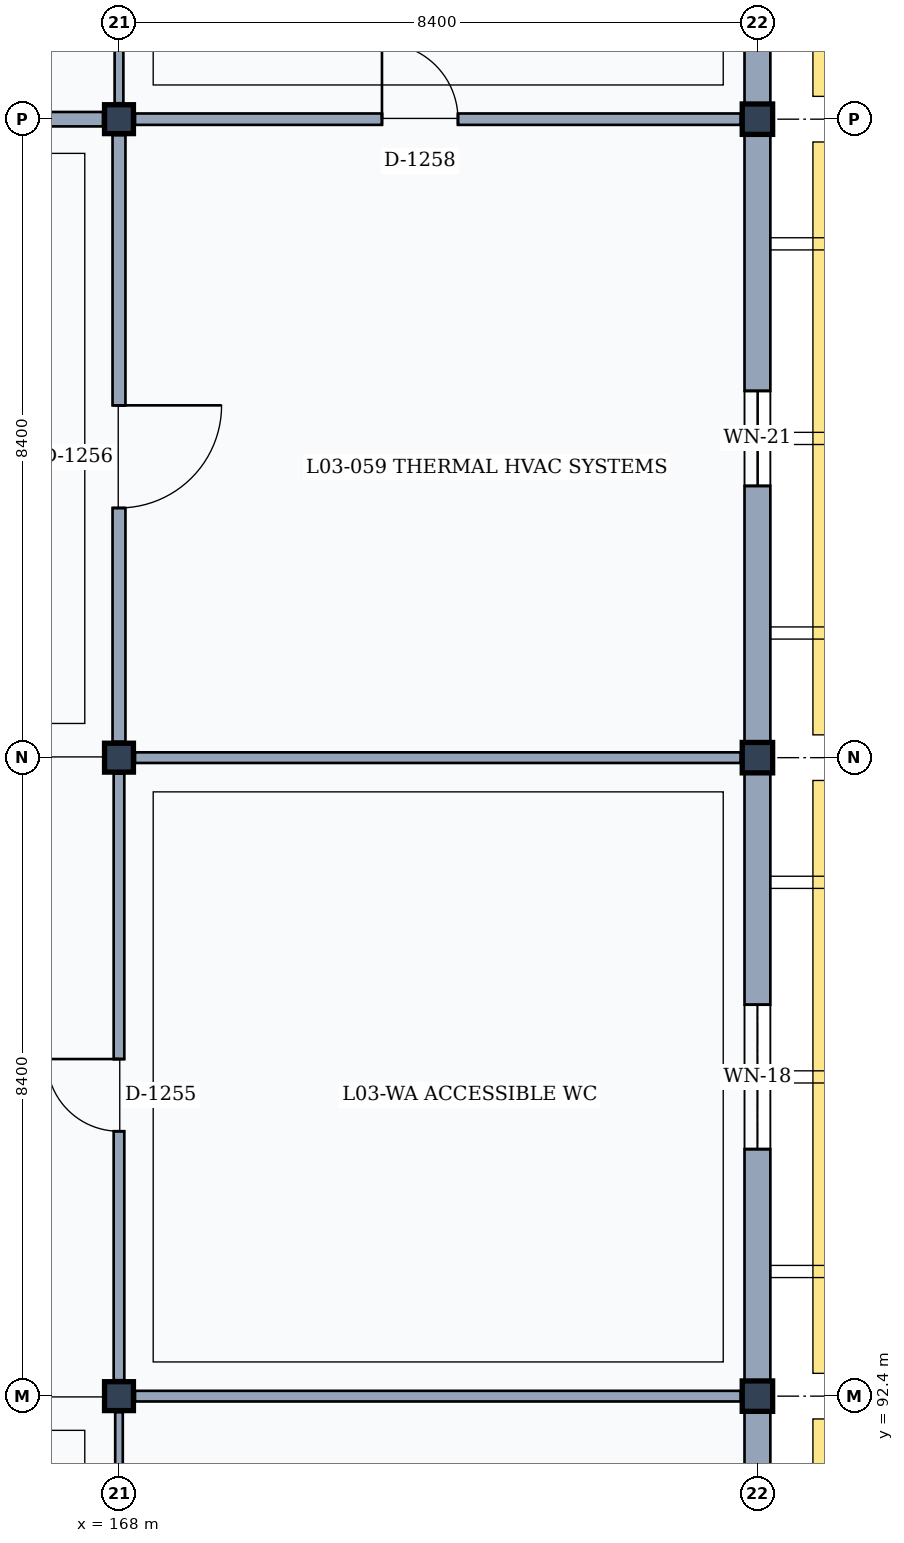
"""IFC4 building model, lengths in metres.
Left out: names, types, materials, properties, quantities, classifications, styles, units other than length and angle.
Written with IfcOpenShell. Run it as: python <this file> out.ifc"""

import sys

from ifc_helpers import new_model, si_unit, direction, frame, frame_2d, origin, origin_2d, place, context, subcontext, project, spatial, rectangle, extrude, element, fill, save


model = new_model("IFC4")
c1 = context("Model", 3, precision=1e-05, world=origin(), true_north=direction((0.0, 1.0)))
c2 = subcontext(c1, "Body", "Model", "MODEL_VIEW")
j1 = project(units=[si_unit("LENGTHUNIT", "METRE"), si_unit("PLANEANGLEUNIT", "RADIAN")], contexts=[c1])
p1 = place(None, origin())
s1 = spatial("IfcSite", under=j1, at=p1, CompositionType="ELEMENT")
p2 = place(p1, origin())
s2 = spatial("IfcBuilding", under=s1, at=p2, CompositionType="ELEMENT")
p3 = place(p2, frame((0.0, 0.0, 13.8)))
s3 = spatial("IfcBuildingStorey", under=s2, at=p3, CompositionType="ELEMENT", Elevation=13.8)
for number, where, z_axis, x_axis in (
    (1, (168.0, 92.4, 0.0), (0.0, 0.0, 1.0), (1.0, 0.0, 0.0)),
    (2, (168.0, 100.8, 0.0), (0.0, 0.0, 1.0), (1.0, 0.0, 0.0)),
    (3, (168.0, 109.2, 0.0), (0.0, 0.0, 1.0), (1.0, 0.0, 0.0)),
):
    element("IfcColumn", number, at=place(p3, frame(where, z_axis=z_axis, x_axis=x_axis)), inside=s3, PredefinedType="COLUMN", context=c2, shape_type="SweptSolid", body=[
        extrude(rectangle(XDim=0.38, YDim=0.38, at=origin_2d()), origin(), (0.0, 0.0, 1.0), 4.2),
    ])
for number, where, z_axis, x_axis in (
    (4, (176.4, 92.4, 0.0), (0.0, 0.0, 1.0), (1.0, 0.0, 0.0)),
    (5, (176.4, 100.8, 0.0), (0.0, 0.0, 1.0), (1.0, 0.0, 0.0)),
    (6, (176.4, 109.2, 0.0), (0.0, 0.0, 1.0), (1.0, 0.0, 0.0)),
):
    element("IfcColumn", number, at=place(p3, frame(where, z_axis=z_axis, x_axis=x_axis)), inside=s3, PredefinedType="COLUMN", context=c2, shape_type="SweptSolid", body=[
        extrude(rectangle(XDim=0.4, YDim=0.4, at=origin_2d()), origin(), (0.0, 0.0, 1.0), 4.2),
    ])
p4 = place(p3, frame((176.4, 92.2, 0.0), z_axis=(0.0, 0.0, 1.0), x_axis=(0.0, -1.0, 0.0)))
e7 = element("IfcWall", 7, at=p4, inside=s3, PredefinedType="SOLIDWALL", context=c2, shape_type="SweptSolid", body=[
    extrude(rectangle(XDim=8.0, YDim=0.34, at=frame_2d((4.0, 0.0))), origin(), (0.0, 0.0, 1.0), 3.36),
])
p5 = place(p4, frame((3.45, 0.0, 0.9)))
e8 = element("IfcOpeningElement", 8, at=p5, cuts=e7, PredefinedType="OPENING", context=c2, shape_type="SweptSolid", body=[
    extrude(rectangle(XDim=1.1, YDim=1.95, at=frame_2d((0.55, 0.975))), frame((0.0, 0.18, 0.0), z_axis=(0.0, -1.0, 0.0), x_axis=(1.0, 0.0, 0.0)), (0.0, 0.0, 1.0), 0.36),
])
p6 = place(p3, frame((176.4, 100.6, 0.0), z_axis=(0.0, 0.0, 1.0), x_axis=(0.0, -1.0, 0.0)))
e9 = element("IfcWall", 9, at=p6, inside=s3, PredefinedType="SOLIDWALL", context=c2, shape_type="SweptSolid", body=[
    extrude(rectangle(XDim=8.0, YDim=0.34, at=frame_2d((4.0, 0.0))), origin(), (0.0, 0.0, 1.0), 3.36),
])
p7 = place(p6, frame((3.05, 0.0, 0.9)))
e10 = element("IfcOpeningElement", 10, at=p7, cuts=e9, PredefinedType="OPENING", context=c2, shape_type="SweptSolid", body=[
    extrude(rectangle(XDim=1.9, YDim=2.05, at=frame_2d((0.95, 1.025))), frame((0.0, 0.18, 0.0), z_axis=(0.0, -1.0, 0.0), x_axis=(1.0, 0.0, 0.0)), (0.0, 0.0, 1.0), 0.36),
])
p8 = place(p3, frame((176.4, 109.0, 0.0), z_axis=(0.0, 0.0, 1.0), x_axis=(0.0, -1.0, 0.0)))
e11 = element("IfcWall", 11, at=p8, inside=s3, PredefinedType="SOLIDWALL", context=c2, shape_type="SweptSolid", body=[
    extrude(rectangle(XDim=8.0, YDim=0.34, at=frame_2d((4.0, 0.0))), origin(), (0.0, 0.0, 1.0), 3.36),
])
p9 = place(p8, frame((3.375, 0.0, 0.9)))
e12 = element("IfcOpeningElement", 12, at=p9, cuts=e11, PredefinedType="OPENING", context=c2, shape_type="SweptSolid", body=[
    extrude(rectangle(XDim=1.25, YDim=1.7, at=frame_2d((0.625, 0.85))), frame((0.0, 0.18, 0.0), z_axis=(0.0, -1.0, 0.0), x_axis=(1.0, 0.0, 0.0)), (0.0, 0.0, 1.0), 0.36),
])
p10 = place(p3, frame((176.4, 117.4, 0.0), z_axis=(0.0, 0.0, 1.0), x_axis=(0.0, -1.0, 0.0)))
e13 = element("IfcWall", 13, at=p10, inside=s3, PredefinedType="SOLIDWALL", context=c2, shape_type="SweptSolid", body=[
    extrude(rectangle(XDim=8.0, YDim=0.34, at=frame_2d((4.0, 0.0))), origin(), (0.0, 0.0, 1.0), 3.36),
])
p11 = place(p10, frame((3.075, 0.0, 0.9)))
e14 = element("IfcOpeningElement", 14, at=p11, cuts=e13, PredefinedType="OPENING", context=c2, shape_type="SweptSolid", body=[
    extrude(rectangle(XDim=1.85, YDim=1.65, at=frame_2d((0.925, 0.825))), frame((0.0, 0.18, 0.0), z_axis=(0.0, -1.0, 0.0), x_axis=(1.0, 0.0, 0.0)), (0.0, 0.0, 1.0), 0.36),
])
p12 = place(p3, frame((168.0, 84.21, 0.0), z_axis=(0.0, 0.0, 1.0), x_axis=(0.0, 1.0, 0.0)))
e15 = element("IfcWall", 15, at=p12, inside=s3, PredefinedType="MOVABLE", context=c2, shape_type="SweptSolid", body=[
    extrude(rectangle(XDim=7.98, YDim=0.1, at=frame_2d((3.99, 0.0))), origin(), (0.0, 0.0, 1.0), 3.32),
])
p13 = place(p12, frame((3.3, 0.0, 0.0)))
e16 = element("IfcOpeningElement", 16, at=p13, cuts=e15, PredefinedType="OPENING", context=c2, shape_type="SweptSolid", body=[
    extrude(rectangle(XDim=0.9, YDim=2.1, at=frame_2d((0.45, 1.05))), frame((0.0, 0.06, 0.0), z_axis=(0.0, -1.0, 0.0), x_axis=(1.0, 0.0, 0.0)), (0.0, 0.0, 1.0), 0.12),
])
p14 = place(p3, frame((168.0, 92.61, 0.0), z_axis=(0.0, 0.0, 1.0), x_axis=(0.0, 1.0, 0.0)))
e17 = element("IfcWall", 17, at=p14, inside=s3, PredefinedType="PARTITIONING", context=c2, shape_type="SweptSolid", body=[
    extrude(rectangle(XDim=7.98, YDim=0.14, at=frame_2d((3.99, 0.0))), origin(), (0.0, 0.0, 1.0), 3.32),
])
p15 = place(p14, frame((3.275, 0.0, 0.0)))
e18 = element("IfcOpeningElement", 18, at=p15, cuts=e17, PredefinedType="OPENING", context=c2, shape_type="SweptSolid", body=[
    extrude(rectangle(XDim=0.95, YDim=2.15, at=frame_2d((0.475, 1.075))), frame((0.0, 0.08, 0.0), z_axis=(0.0, -1.0, 0.0), x_axis=(1.0, 0.0, 0.0)), (0.0, 0.0, 1.0), 0.16),
])
p16 = place(p3, frame((168.0, 101.01, 0.0), z_axis=(0.0, 0.0, 1.0), x_axis=(0.0, 1.0, 0.0)))
e19 = element("IfcWall", 19, at=p16, inside=s3, PredefinedType="PARTITIONING", context=c2, shape_type="SweptSolid", body=[
    extrude(rectangle(XDim=7.98, YDim=0.17, at=frame_2d((3.99, 0.0))), origin(), (0.0, 0.0, 1.0), 3.32),
])
p17 = place(p16, frame((3.075, 0.0, 0.0)))
e20 = element("IfcOpeningElement", 20, at=p17, cuts=e19, PredefinedType="OPENING", context=c2, shape_type="SweptSolid", body=[
    extrude(rectangle(XDim=1.35, YDim=2.25, at=frame_2d((0.675, 1.125))), frame((0.0, 0.095, 0.0), z_axis=(0.0, -1.0, 0.0), x_axis=(1.0, 0.0, 0.0)), (0.0, 0.0, 1.0), 0.19),
])
p18 = place(p3, frame((159.82, 109.2, 0.0), z_axis=(0.0, 0.0, 1.0), x_axis=(1.0, 0.0, 0.0)))
e21 = element("IfcWall", 21, at=p18, inside=s3, PredefinedType="PARTITIONING", context=c2, shape_type="SweptSolid", body=[
    extrude(rectangle(XDim=7.97, YDim=0.19, at=frame_2d((3.985, 0.0))), origin(), (0.0, 0.0, 1.0), 3.22),
])
p19 = place(p18, frame((3.025, 0.0, 0.0)))
e22 = element("IfcOpeningElement", 22, at=p19, cuts=e21, PredefinedType="OPENING", context=c2, shape_type="SweptSolid", body=[
    extrude(rectangle(XDim=1.45, YDim=2.35, at=frame_2d((0.725, 1.175))), frame((0.0, 0.105, 0.0), z_axis=(0.0, -1.0, 0.0), x_axis=(1.0, 0.0, 0.0)), (0.0, 0.0, 1.0), 0.21),
])
p20 = place(p3, frame((168.0, 109.41, 0.0), z_axis=(0.0, 0.0, 1.0), x_axis=(0.0, 1.0, 0.0)))
e23 = element("IfcWall", 23, at=p20, inside=s3, PredefinedType="PARTITIONING", context=c2, shape_type="SweptSolid", body=[
    extrude(rectangle(XDim=7.98, YDim=0.115, at=frame_2d((3.99, 0.0))), origin(), (0.0, 0.0, 1.0), 3.32),
])
for number, where, z_axis, x_axis in (
    (24, (168.21, 92.4, 0.0), (0.0, 0.0, 1.0), (1.0, 0.0, 0.0)),
    (25, (168.21, 100.8, 0.0), (0.0, 0.0, 1.0), (1.0, 0.0, 0.0)),
):
    element("IfcWall", number, at=place(p3, frame(where, z_axis=z_axis, x_axis=x_axis)), inside=s3, PredefinedType="PARTITIONING", context=c2, shape_type="SweptSolid", body=[
        extrude(rectangle(XDim=7.97, YDim=0.14, at=frame_2d((3.985, 0.0))), origin(), (0.0, 0.0, 1.0), 3.22),
    ])
p21 = place(p3, frame((168.21, 109.2, 0.0), z_axis=(0.0, 0.0, 1.0), x_axis=(1.0, 0.0, 0.0)))
e26 = element("IfcWall", 26, at=p21, inside=s3, PredefinedType="PARTITIONING", context=c2, shape_type="SweptSolid", body=[
    extrude(rectangle(XDim=7.97, YDim=0.15, at=frame_2d((3.985, 0.0))), origin(), (0.0, 0.0, 1.0), 3.22),
])
p22 = place(p21, frame((3.25, 0.0, 0.0)))
e27 = element("IfcOpeningElement", 27, at=p22, cuts=e26, PredefinedType="OPENING", context=c2, shape_type="SweptSolid", body=[
    extrude(rectangle(XDim=1.0, YDim=2.15, at=frame_2d((0.5, 1.075))), frame((0.0, 0.085, 0.0), z_axis=(0.0, -1.0, 0.0), x_axis=(1.0, 0.0, 0.0)), (0.0, 0.0, 1.0), 0.17),
])
p23 = place(p7, origin())
e28 = element("IfcWindow", 28, at=p23, inside=s3, PartitioningType="SINGLE_PANEL", PredefinedType="WINDOW", context=c2, shape_type="SweptSolid", body=[
    extrude(rectangle(XDim=1.9, YDim=2.05, at=frame_2d((0.95, 1.025))), frame((0.0, 0.03, 0.0), z_axis=(0.0, -1.0, 0.0), x_axis=(1.0, 0.0, 0.0)), (0.0, 0.0, 1.0), 0.06),
])
fill(e10, e28)
p24 = place(p9, origin())
e29 = element("IfcWindow", 29, at=p24, inside=s3, PartitioningType="SINGLE_PANEL", PredefinedType="WINDOW", context=c2, shape_type="SweptSolid", body=[
    extrude(rectangle(XDim=1.25, YDim=1.7, at=frame_2d((0.625, 0.85))), frame((0.0, 0.03, 0.0), z_axis=(0.0, -1.0, 0.0), x_axis=(1.0, 0.0, 0.0)), (0.0, 0.0, 1.0), 0.06),
])
fill(e12, e29)
p25 = place(p15, origin())
e30 = element("IfcDoor", 30, at=p25, inside=s3, OperationType="SINGLE_SWING_RIGHT", PredefinedType="DOOR", context=c2, shape_type="SweptSolid", body=[
    extrude(rectangle(XDim=0.95, YDim=2.15, at=frame_2d((0.475, 1.075))), frame((0.0, 0.025, 0.0), z_axis=(0.0, -1.0, 0.0), x_axis=(1.0, 0.0, 0.0)), (0.0, 0.0, 1.0), 0.05),
])
fill(e18, e30)
p26 = place(p17, frame((1.35, 0.0, 0.0), z_axis=(0.0, 0.0, 1.0), x_axis=(-1.0, 0.0, 0.0)))
e31 = element("IfcDoor", 31, at=p26, inside=s3, OperationType="SINGLE_SWING_LEFT", PredefinedType="DOOR", context=c2, shape_type="SweptSolid", body=[
    extrude(rectangle(XDim=1.35, YDim=2.25, at=frame_2d((0.675, 1.125))), frame((0.0, 0.025, 0.0), z_axis=(0.0, -1.0, 0.0), x_axis=(1.0, 0.0, 0.0)), (0.0, 0.0, 1.0), 0.05),
])
fill(e20, e31)
p27 = place(p22, origin())
e32 = element("IfcDoor", 32, at=p27, inside=s3, OperationType="SINGLE_SWING_LEFT", PredefinedType="DOOR", context=c2, shape_type="SweptSolid", body=[
    extrude(rectangle(XDim=1.0, YDim=2.15, at=frame_2d((0.5, 1.075))), frame((0.0, 0.025, 0.0), z_axis=(0.0, -1.0, 0.0), x_axis=(1.0, 0.0, 0.0)), (0.0, 0.0, 1.0), 0.05),
])
fill(e27, e32)
save(model, sys.argv[1])
